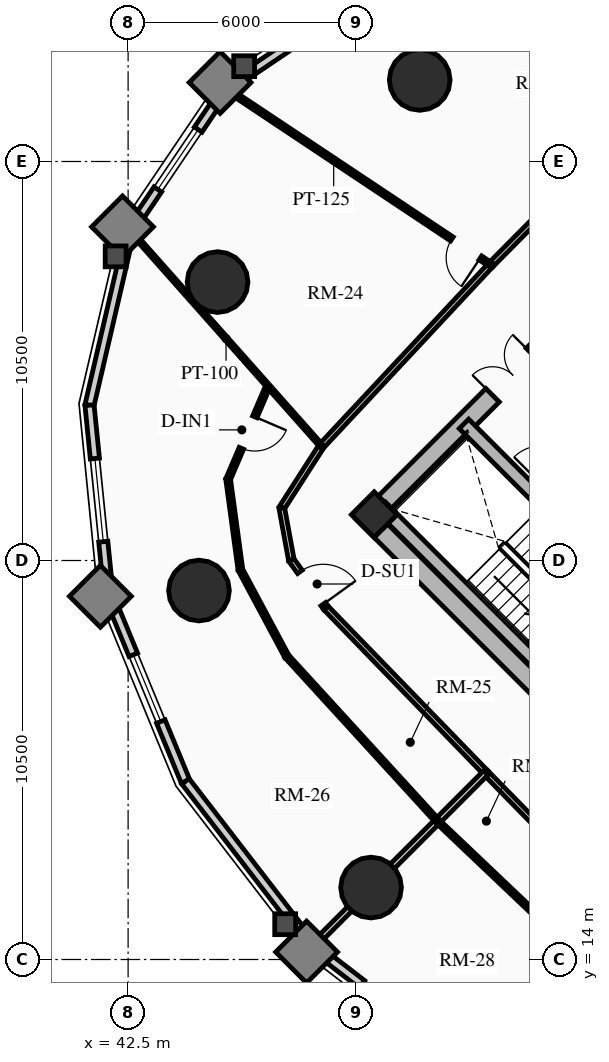
"""IFC4 building model, lengths in metres.
Left out: names, types, materials, properties, quantities, classifications, styles, units other than length and angle.
Written with IfcOpenShell. Run it as: python <this file> out.ifc"""

import sys

from ifc_helpers import new_model, si_unit, direction, frame, frame_2d, origin, origin_2d, place, context, subcontext, project, spatial, rectangle, circle, extrude, source, transform, mapped, element, fill, save


model = new_model("IFC4")
c1 = context("Model", 3, precision=1e-05, world=origin(), true_north=direction((0.0, 1.0)))
c2 = subcontext(c1, "Body", "Model", "MODEL_VIEW")
j1 = project(units=[si_unit("LENGTHUNIT", "METRE"), si_unit("PLANEANGLEUNIT", "RADIAN")], contexts=[c1])
p1 = place(None, origin())
s1 = spatial("IfcSite", under=j1, at=p1, CompositionType="ELEMENT")
p2 = place(p1, origin())
s2 = spatial("IfcBuilding", under=s1, at=p2, CompositionType="ELEMENT")
p3 = place(p2, frame((0.0, 0.0, 22.0)))
s3 = spatial("IfcBuildingStorey", under=s2, at=p3, CompositionType="ELEMENT", Elevation=22.0)
p4 = place(p3, frame((58.773, 15.661, 0.0), z_axis=(0.0, 0.0, 1.0), x_axis=(-0.707106781187, 0.707106781187, 0.0)))
e1 = element("IfcWall", 1, at=p4, inside=s3, PredefinedType="SHEAR", context=c2, shape_type="SweptSolid", body=[
    extrude(rectangle(XDim=14.3, YDim=0.5, at=frame_2d((7.15, 0.0))), origin(), (0.0, 0.0, 1.0), 2.91),
])
p5 = place(p3, frame((48.838, 25.596, 0.0), z_axis=(0.0, 0.0, 1.0), x_axis=(0.707106781187, 0.707106781187, 0.0)))
e2 = element("IfcWall", 2, at=p5, inside=s3, PredefinedType="SHEAR", context=c2, shape_type="SweptSolid", body=[
    extrude(rectangle(XDim=10.7, YDim=0.5, at=frame_2d((5.35, 0.0))), origin(), (0.0, 0.0, 1.0), 2.91),
])
m1 = source(origin(), c2, "Body", "SweptSolid", [
    extrude(rectangle(XDim=1.5, YDim=2.02, at=frame_2d((0.75, 1.01))), frame((0.0, 0.26, 0.0), z_axis=(0.0, -1.0, 0.0), x_axis=(1.0, 0.0, 0.0)), (0.0, 0.0, 1.0), 0.52),
])
p6 = place(p5, frame((4.6, 0.0, 0.0)))
e3 = element("IfcOpeningElement", 3, at=p6, cuts=e2, PredefinedType="OPENING", context=c2, shape_type="MappedRepresentation", body=[
    mapped(m1, transform((0.0, 0.0, 0.0), x_axis=(1.0, 0.0, 0.0), y_axis=(0.0, 1.0, 0.0), z_axis=(0.0, 0.0, 1.0), scale=1.0)),
])
p7 = place(p3, frame((61.096, 18.338, 0.0), z_axis=(0.0, 0.0, 1.0), x_axis=(-0.707106781187, 0.707106781187, 0.0)))
e4 = element("IfcWall", 4, at=p7, inside=s3, PredefinedType="SHEAR", context=c2, shape_type="SweptSolid", body=[
    extrude(rectangle(XDim=13.8, YDim=0.35, at=frame_2d((6.9, 0.0))), origin(), (0.0, 0.0, 1.0), 2.91),
])
m2 = source(origin(), c2, "Body", "SweptSolid", [
    extrude(rectangle(XDim=1.1, YDim=2.015, at=frame_2d((0.55, 1.007))), frame((0.0, 0.185, 0.0), z_axis=(0.0, -1.0, 0.0), x_axis=(1.0, 0.0, 0.0)), (0.0, 0.0, 1.0), 0.37),
])
p8 = place(p7, frame((4.9, 0.0, 0.0)))
e5 = element("IfcOpeningElement", 5, at=p8, cuts=e4, PredefinedType="OPENING", context=c2, shape_type="MappedRepresentation", body=[
    mapped(m2, transform((0.0, 0.0, 0.0), x_axis=(1.0, 0.0, 0.0), y_axis=(0.0, 1.0, 0.0), z_axis=(0.0, 0.0, 1.0), scale=1.0)),
])
m3 = source(origin(), c2, "Body", "SweptSolid", [
    extrude(rectangle(XDim=1.15, YDim=2.02, at=frame_2d((0.575, 1.01))), frame((0.0, 0.185, 0.0), z_axis=(0.0, -1.0, 0.0), x_axis=(1.0, 0.0, 0.0)), (0.0, 0.0, 1.0), 0.37),
])
p9 = place(p7, frame((7.32, 0.0, 0.0)))
e6 = element("IfcOpeningElement", 6, at=p9, cuts=e4, PredefinedType="OPENING", context=c2, shape_type="MappedRepresentation", body=[
    mapped(m3, transform((0.0, 0.0, 0.0), x_axis=(1.0, 0.0, 0.0), y_axis=(0.0, 1.0, 0.0), z_axis=(0.0, 0.0, 1.0), scale=1.0)),
])
p10 = place(p3, frame((53.922, 21.141, 0.0), z_axis=(0.0, 0.0, 1.0), x_axis=(-0.707106781187, 0.707106781187, 0.0)))
e7 = element("IfcWall", 7, at=p10, inside=s3, PredefinedType="SHEAR", context=c2, shape_type="SweptSolid", body=[
    extrude(rectangle(XDim=6.745, YDim=0.35, at=frame_2d((3.373, 0.0))), origin(), (0.0, 0.0, 1.0), 2.91),
])
p11 = place(p3, frame((48.976, 25.706, 0.0), z_axis=(0.0, 0.0, 1.0), x_axis=(0.707106781187, 0.707106781187, 0.0)))
e8 = element("IfcColumn", 8, at=p11, inside=s3, PredefinedType="COLUMN", context=c2, shape_type="SweptSolid", body=[
    extrude(rectangle(XDim=0.85, YDim=0.85, at=origin_2d()), origin(), (0.0, 0.0, 1.0), 2.91),
])
for number, where, z_axis, x_axis in (
    (9, (50.173, 37.146, 0.0), (0.0, 0.0, 1.0), (1.0, 0.0, 0.0)),
    (10, (44.854, 31.827, 0.0), (0.0, 0.0, 1.0), (1.0, 0.0, 0.0)),
    (11, (44.365, 23.709, 0.0), (0.0, 0.0, 1.0), (1.0, 0.0, 0.0)),
    (12, (48.893, 15.893, 0.0), (0.0, 0.0, 1.0), (1.0, 0.0, 0.0)),
):
    element("IfcColumn", number, at=place(p3, frame(where, z_axis=z_axis, x_axis=x_axis)), inside=s3, PredefinedType="USERDEFINED", context=c2, shape_type="SweptSolid", body=[
        extrude(circle(Radius=0.8, at=origin_2d()), origin(), (0.0, 0.0, 1.0), 2.91),
    ])
p12 = place(p3, frame((45.076, 36.924, 0.0), z_axis=(0.0, 0.0, 1.0), x_axis=(0.828776615238, 0.559579594012, 0.0)))
e13 = element("IfcWall", 13, at=p12, inside=s3, PredefinedType="SOLIDWALL", context=c2, shape_type="SweptSolid", body=[
    extrude(rectangle(XDim=4.517, YDim=0.24, at=frame_2d((2.259, 0.0))), origin(), (0.0, 0.0, 1.0), 2.073),
])
p13 = place(p3, frame((42.548, 33.18, 0.0), z_axis=(0.0, 0.0, 1.0), x_axis=(0.559579594012, 0.828776615238, 0.0)))
e14 = element("IfcWall", 14, at=p13, inside=s3, PredefinedType="SOLIDWALL", context=c2, shape_type="SweptSolid", body=[
    extrude(rectangle(XDim=4.517, YDim=0.24, at=frame_2d((2.259, 0.0))), origin(), (0.0, 0.0, 1.0), 2.073),
])
m4 = source(origin(), c2, "Body", "SweptSolid", [
    extrude(rectangle(XDim=1.9, YDim=1.35, at=frame_2d((0.95, 0.675))), frame((0.0, 0.13, 0.0), z_axis=(0.0, -1.0, 0.0), x_axis=(1.0, 0.0, 0.0)), (0.0, 0.0, 1.0), 0.26),
])
p14 = place(p13, frame((1.309, 0.0, 0.65)))
e15 = element("IfcOpeningElement", 15, at=p14, cuts=e14, PredefinedType="OPENING", context=c2, shape_type="MappedRepresentation", body=[
    mapped(m4, transform((0.0, 0.0, 0.0), x_axis=(1.0, 0.0, 0.0), y_axis=(0.0, 1.0, 0.0), z_axis=(0.0, 0.0, 1.0), scale=1.0)),
])
p15 = place(p3, frame((41.484, 28.586, 0.0), z_axis=(0.0, 0.0, 1.0), x_axis=(0.225698919833, 0.974197104074, 0.0)))
e16 = element("IfcWall", 16, at=p15, inside=s3, PredefinedType="SOLIDWALL", context=c2, shape_type="SweptSolid", body=[
    extrude(rectangle(XDim=4.715, YDim=0.24, at=frame_2d((2.357, 0.0))), origin(), (0.0, 0.0, 1.0), 2.073),
])
p16 = place(p3, frame((41.988, 23.593, 0.0), z_axis=(0.0, 0.0, 1.0), x_axis=(-0.100356187272, 0.994951574538, 0.0)))
e17 = element("IfcWall", 17, at=p16, inside=s3, PredefinedType="SOLIDWALL", context=c2, shape_type="SweptSolid", body=[
    extrude(rectangle(XDim=5.019, YDim=0.24, at=frame_2d((2.509, 0.0))), origin(), (0.0, 0.0, 1.0), 2.073),
])
m5 = source(origin(), c2, "Body", "SweptSolid", [
    extrude(rectangle(XDim=2.2, YDim=1.35, at=frame_2d((1.1, 0.675))), frame((0.0, 0.13, 0.0), z_axis=(0.0, -1.0, 0.0), x_axis=(1.0, 0.0, 0.0)), (0.0, 0.0, 1.0), 0.26),
])
p17 = place(p16, frame((1.409, 0.0, 0.65)))
e18 = element("IfcOpeningElement", 18, at=p17, cuts=e17, PredefinedType="OPENING", context=c2, shape_type="MappedRepresentation", body=[
    mapped(m5, transform((0.0, 0.0, 0.0), x_axis=(1.0, 0.0, 0.0), y_axis=(0.0, 1.0, 0.0), z_axis=(0.0, 0.0, 1.0), scale=1.0)),
])
p18 = place(p3, frame((44.01, 18.688, 0.0), z_axis=(0.0, 0.0, 1.0), x_axis=(-0.381113147118, 0.924528403616, 0.0)))
e19 = element("IfcWall", 19, at=p18, inside=s3, PredefinedType="SOLIDWALL", context=c2, shape_type="SweptSolid", body=[
    extrude(rectangle(XDim=5.305, YDim=0.24, at=frame_2d((2.653, 0.0))), origin(), (0.0, 0.0, 1.0), 2.073),
])
p19 = place(p18, frame((1.703, 0.0, 0.65)))
e20 = element("IfcOpeningElement", 20, at=p19, cuts=e19, PredefinedType="OPENING", context=c2, shape_type="MappedRepresentation", body=[
    mapped(m4, transform((0.0, 0.0, 0.0), x_axis=(1.0, 0.0, 0.0), y_axis=(0.0, 1.0, 0.0), z_axis=(0.0, 0.0, 1.0), scale=1.0)),
])
p20 = place(p3, frame((47.352, 14.352, 0.0), z_axis=(0.0, 0.0, 1.0), x_axis=(-0.610557396243, 0.791972010801, 0.0)))
e21 = element("IfcWall", 21, at=p20, inside=s3, PredefinedType="SOLIDWALL", context=c2, shape_type="SweptSolid", body=[
    extrude(rectangle(XDim=5.475, YDim=0.24, at=frame_2d((2.737, 0.0))), origin(), (0.0, 0.0, 1.0), 2.073),
])
p21 = place(p3, frame((51.688, 11.01, 0.0), z_axis=(0.0, 0.0, 1.0), x_axis=(-0.791972010801, 0.610557396243, 0.0)))
e22 = element("IfcWall", 22, at=p21, inside=s3, PredefinedType="SOLIDWALL", context=c2, shape_type="SweptSolid", body=[
    extrude(rectangle(XDim=5.475, YDim=0.24, at=frame_2d((2.737, 0.0))), origin(), (0.0, 0.0, 1.0), 2.073),
])
p22 = place(p21, frame((1.637, 0.0, 0.65)))
e23 = element("IfcOpeningElement", 23, at=p22, cuts=e22, PredefinedType="OPENING", context=c2, shape_type="MappedRepresentation", body=[
    mapped(m5, transform((0.0, 0.0, 0.0), x_axis=(1.0, 0.0, 0.0), y_axis=(0.0, 1.0, 0.0), z_axis=(0.0, 0.0, 1.0), scale=1.0)),
])
p23 = place(p3, frame((54.427, 34.683, 0.0), z_axis=(0.0, 0.0, 1.0), x_axis=(-0.704178989986, -0.710022499687, 0.0)))
e24 = element("IfcWall", 24, at=p23, inside=s3, PredefinedType="PARTITIONING", context=c2, shape_type="SweptSolid", body=[
    extrude(rectangle(XDim=3.384, YDim=0.15, at=frame_2d((1.692, 0.0))), origin(), (0.0, 0.0, 1.0), 2.159),
])
p24 = place(p3, frame((52.043, 32.28, 0.0), z_axis=(0.0, 0.0, 1.0), x_axis=(-0.682606081633, -0.730786519661, 0.0)))
e25 = element("IfcWall", 25, at=p24, inside=s3, PredefinedType="PARTITIONING", context=c2, shape_type="SweptSolid", body=[
    extrude(rectangle(XDim=6.527, YDim=0.15, at=frame_2d((3.263, 0.0))), origin(), (0.0, 0.0, 1.0), 2.159),
])
p25 = place(p3, frame((47.588, 27.51, 0.0), z_axis=(0.0, 0.0, 1.0), x_axis=(-0.540202619347, -0.841534984449, 0.0)))
e26 = element("IfcWall", 26, at=p25, inside=s3, PredefinedType="PARTITIONING", context=c2, shape_type="SweptSolid", body=[
    extrude(rectangle(XDim=1.935, YDim=0.15, at=frame_2d((0.967, 0.0))), origin(), (0.0, 0.0, 1.0), 2.159),
])
p26 = place(p3, frame((46.543, 25.882, 0.0), z_axis=(0.0, 0.0, 1.0), x_axis=(0.181153502579, -0.983454832976, 0.0)))
e27 = element("IfcWall", 27, at=p26, inside=s3, PredefinedType="PARTITIONING", context=c2, shape_type="SweptSolid", body=[
    extrude(rectangle(XDim=1.392, YDim=0.15, at=frame_2d((0.696, 0.0))), origin(), (0.0, 0.0, 1.0), 2.159),
])
p27 = place(p3, frame((46.795, 24.513, 0.0), z_axis=(0.0, 0.0, 1.0), x_axis=(0.585628197524, -0.810579801294, 0.0)))
e28 = element("IfcWall", 28, at=p27, inside=s3, PredefinedType="PARTITIONING", context=c2, shape_type="SweptSolid", body=[
    extrude(rectangle(XDim=1.554, YDim=0.15, at=frame_2d((0.777, 0.0))), origin(), (0.0, 0.0, 1.0), 2.205),
])
m6 = source(origin(), c2, "Body", "SweptSolid", [
    extrude(rectangle(XDim=1.05, YDim=2.015, at=frame_2d((0.525, 1.007))), frame((0.0, 0.085, 0.0), z_axis=(0.0, -1.0, 0.0), x_axis=(1.0, 0.0, 0.0)), (0.0, 0.0, 1.0), 0.17),
])
p28 = place(p27, frame((0.384, 0.0, 0.0)))
e29 = element("IfcOpeningElement", 29, at=p28, cuts=e28, PredefinedType="OPENING", context=c2, shape_type="MappedRepresentation", body=[
    mapped(m6, transform((0.0, 0.0, 0.0), x_axis=(1.0, 0.0, 0.0), y_axis=(0.0, 1.0, 0.0), z_axis=(0.0, 0.0, 1.0), scale=1.0)),
])
p29 = place(p3, frame((47.706, 23.253, 0.0), z_axis=(0.0, 0.0, 1.0), x_axis=(0.696179266346, -0.717867974707, 0.0)))
e30 = element("IfcWall", 30, at=p29, inside=s3, PredefinedType="PARTITIONING", context=c2, shape_type="SweptSolid", body=[
    extrude(rectangle(XDim=6.045, YDim=0.15, at=frame_2d((3.022, 0.0))), origin(), (0.0, 0.0, 1.0), 2.635),
])
p30 = place(p3, frame((51.914, 18.914, 0.0), z_axis=(0.0, 0.0, 1.0), x_axis=(0.699999313799, -0.714143515465, 0.0)))
e31 = element("IfcWall", 31, at=p30, inside=s3, PredefinedType="PARTITIONING", context=c2, shape_type="SweptSolid", body=[
    extrude(rectangle(XDim=6.162, YDim=0.15, at=frame_2d((3.081, 0.0))), origin(), (0.0, 0.0, 1.0), 2.159),
])
p31 = place(p3, frame((47.588, 27.51, 0.0), z_axis=(0.0, 0.0, 1.0), x_axis=(-0.663646630644, 0.74804622159, 0.0)))
e32 = element("IfcWall", 32, at=p31, inside=s3, PredefinedType="MOVABLE", context=c2, shape_type="SweptSolid", body=[
    extrude(rectangle(XDim=7.567, YDim=0.1, at=frame_2d((3.784, 0.0))), origin(), (0.0, 0.0, 1.0), 2.073),
])
p32 = place(p3, frame((51.914, 18.914, 0.0), z_axis=(0.0, 0.0, 1.0), x_axis=(-0.707106781187, -0.707106781187, 0.0)))
e33 = element("IfcWall", 33, at=p32, inside=s3, PredefinedType="PARTITIONING", context=c2, shape_type="SweptSolid", body=[
    extrude(rectangle(XDim=6.431, YDim=0.16, at=frame_2d((3.215, 0.0))), origin(), (0.0, 0.0, 1.0), 2.073),
])
p33 = place(p3, frame((52.043, 32.28, 0.0), z_axis=(0.0, 0.0, 1.0), x_axis=(-0.832355916658, 0.554241488887, 0.0)))
e34 = element("IfcWall", 34, at=p33, inside=s3, PredefinedType="PARTITIONING", context=c2, shape_type="SweptSolid", body=[
    extrude(rectangle(XDim=8.354, YDim=0.125, at=frame_2d((4.177, 0.0))), origin(), (0.0, 0.0, 1.0), 2.073),
])
m7 = source(origin(), c2, "Body", "SweptSolid", [
    extrude(rectangle(XDim=0.9, YDim=2.005, at=frame_2d((0.45, 1.002))), frame((0.0, 0.073, 0.0), z_axis=(0.0, -1.0, 0.0), x_axis=(1.0, 0.0, 0.0)), (0.0, 0.0, 1.0), 0.145),
])
p34 = place(p33, frame((0.33, 0.0, 0.0)))
e35 = element("IfcOpeningElement", 35, at=p34, cuts=e34, PredefinedType="OPENING", context=c2, shape_type="MappedRepresentation", body=[
    mapped(m7, transform((0.0, 0.0, 0.0), x_axis=(1.0, 0.0, 0.0), y_axis=(0.0, 1.0, 0.0), z_axis=(0.0, 0.0, 1.0), scale=1.0)),
])
p35 = place(p3, frame((46.182, 29.095, 0.0), z_axis=(0.0, 0.0, 1.0), x_axis=(-0.39298176502, -0.919546264394, 0.0)))
e36 = element("IfcWall", 36, at=p35, inside=s3, PredefinedType="PARTITIONING", context=c2, shape_type="SweptSolid", body=[
    extrude(rectangle(XDim=2.672, YDim=0.125, at=frame_2d((1.336, 0.0))), origin(), (0.0, 0.0, 1.0), 2.205),
])
p36 = place(p35, frame((0.886, 0.0, 0.0)))
e37 = element("IfcOpeningElement", 37, at=p36, cuts=e36, PredefinedType="OPENING", context=c2, shape_type="MappedRepresentation", body=[
    mapped(m7, transform((0.0, 0.0, 0.0), x_axis=(1.0, 0.0, 0.0), y_axis=(0.0, 1.0, 0.0), z_axis=(0.0, 0.0, 1.0), scale=1.0)),
])
p37 = place(p3, frame((45.132, 26.638, 0.0), z_axis=(0.0, 0.0, 1.0), x_axis=(0.134279147929, -0.990943545532, 0.0)))
e38 = element("IfcWall", 38, at=p37, inside=s3, PredefinedType="PARTITIONING", context=c2, shape_type="SweptSolid", body=[
    extrude(rectangle(XDim=2.404, YDim=0.125, at=frame_2d((1.202, 0.0))), origin(), (0.0, 0.0, 1.0), 2.159),
])
p38 = place(p3, frame((45.455, 24.256, 0.0), z_axis=(0.0, 0.0, 1.0), x_axis=(0.472268582458, -0.881454698792, 0.0)))
e39 = element("IfcWall", 39, at=p38, inside=s3, PredefinedType="PARTITIONING", context=c2, shape_type="SweptSolid", body=[
    extrude(rectangle(XDim=2.585, YDim=0.125, at=frame_2d((1.292, 0.0))), origin(), (0.0, 0.0, 1.0), 2.159),
])
p39 = place(p3, frame((46.676, 21.978, 0.0), z_axis=(0.0, 0.0, 1.0), x_axis=(0.67473816271, -0.738057187339, 0.0)))
e40 = element("IfcWall", 40, at=p39, inside=s3, PredefinedType="PARTITIONING", context=c2, shape_type="SweptSolid", body=[
    extrude(rectangle(XDim=5.876, YDim=0.125, at=frame_2d((2.938, 0.0))), origin(), (0.0, 0.0, 1.0), 2.635),
])
p40 = place(p3, frame((50.641, 17.641, 0.0), z_axis=(0.0, 0.0, 1.0), x_axis=(0.724909383019, -0.688844239586, 0.0)))
e41 = element("IfcWall", 41, at=p40, inside=s3, PredefinedType="PARTITIONING", context=c2, shape_type="SweptSolid", body=[
    extrude(rectangle(XDim=5.957, YDim=0.125, at=frame_2d((2.979, 0.0))), origin(), (0.0, 0.0, 1.0), 2.159),
])
m8 = source(origin(), c2, "Body", "SweptSolid", [
    extrude(rectangle(XDim=1.9, YDim=1.35, at=frame_2d((0.95, 0.675))), frame((0.0, 0.03, 0.0), z_axis=(0.0, -1.0, 0.0), x_axis=(1.0, 0.0, 0.0)), (0.0, 0.0, 1.0), 0.06),
])
p41 = place(p14, origin())
e42 = element("IfcWindow", 42, at=p41, inside=s3, PartitioningType="DOUBLE_PANEL_VERTICAL", PredefinedType="WINDOW", context=c2, shape_type="MappedRepresentation", body=[
    mapped(m8, transform((0.0, 0.0, 0.0), x_axis=(1.0, 0.0, 0.0), y_axis=(0.0, 1.0, 0.0), z_axis=(0.0, 0.0, 1.0), scale=1.0)),
])
fill(e15, e42)
m9 = source(origin(), c2, "Body", "SweptSolid", [
    extrude(rectangle(XDim=2.2, YDim=1.35, at=frame_2d((1.1, 0.675))), frame((0.0, 0.03, 0.0), z_axis=(0.0, -1.0, 0.0), x_axis=(1.0, 0.0, 0.0)), (0.0, 0.0, 1.0), 0.06),
])
p42 = place(p17, origin())
e43 = element("IfcWindow", 43, at=p42, inside=s3, PartitioningType="DOUBLE_PANEL_VERTICAL", PredefinedType="WINDOW", context=c2, shape_type="MappedRepresentation", body=[
    mapped(m9, transform((0.0, 0.0, 0.0), x_axis=(1.0, 0.0, 0.0), y_axis=(0.0, 1.0, 0.0), z_axis=(0.0, 0.0, 1.0), scale=1.0)),
])
fill(e18, e43)
p43 = place(p19, origin())
e44 = element("IfcWindow", 44, at=p43, inside=s3, PartitioningType="DOUBLE_PANEL_VERTICAL", PredefinedType="WINDOW", context=c2, shape_type="MappedRepresentation", body=[
    mapped(m8, transform((0.0, 0.0, 0.0), x_axis=(1.0, 0.0, 0.0), y_axis=(0.0, 1.0, 0.0), z_axis=(0.0, 0.0, 1.0), scale=1.0)),
])
fill(e20, e44)
m10 = source(origin(), c2, "Body", "SweptSolid", [
    extrude(rectangle(XDim=1.5, YDim=2.02, at=frame_2d((0.75, 1.01))), frame((0.0, 0.025, 0.0), z_axis=(0.0, -1.0, 0.0), x_axis=(1.0, 0.0, 0.0)), (0.0, 0.0, 1.0), 0.05),
])
p44 = place(p6, origin())
e45 = element("IfcDoor", 45, at=p44, inside=s3, OperationType="DOUBLE_DOOR_SINGLE_SWING", PredefinedType="DOOR", context=c2, shape_type="MappedRepresentation", body=[
    mapped(m10, transform((0.0, 0.0, 0.0), x_axis=(1.0, 0.0, 0.0), y_axis=(0.0, 1.0, 0.0), z_axis=(0.0, 0.0, 1.0), scale=1.0)),
])
fill(e3, e45)
m11 = source(origin(), c2, "Body", "SweptSolid", [
    extrude(rectangle(XDim=0.9, YDim=2.005, at=frame_2d((0.45, 1.002))), frame((0.0, 0.025, 0.0), z_axis=(0.0, -1.0, 0.0), x_axis=(1.0, 0.0, 0.0)), (0.0, 0.0, 1.0), 0.05),
])
p45 = place(p34, origin())
e46 = element("IfcDoor", 46, at=p45, inside=s3, OperationType="SINGLE_SWING_LEFT", PredefinedType="DOOR", context=c2, shape_type="MappedRepresentation", body=[
    mapped(m11, transform((0.0, 0.0, 0.0), x_axis=(1.0, 0.0, 0.0), y_axis=(0.0, 1.0, 0.0), z_axis=(0.0, 0.0, 1.0), scale=1.0)),
])
fill(e35, e46)
m12 = source(origin(), c2, "Body", "SweptSolid", [
    extrude(rectangle(XDim=1.05, YDim=2.015, at=frame_2d((0.525, 1.007))), frame((0.0, 0.025, 0.0), z_axis=(0.0, -1.0, 0.0), x_axis=(1.0, 0.0, 0.0)), (0.0, 0.0, 1.0), 0.05),
])
p46 = place(p28, origin())
e47 = element("IfcDoor", 47, at=p46, inside=s3, OperationType="SINGLE_SWING_RIGHT", PredefinedType="DOOR", context=c2, shape_type="MappedRepresentation", body=[
    mapped(m12, transform((0.0, 0.0, 0.0), x_axis=(1.0, 0.0, 0.0), y_axis=(0.0, 1.0, 0.0), z_axis=(0.0, 0.0, 1.0), scale=1.0)),
])
fill(e29, e47)
p47 = place(p36, origin())
e48 = element("IfcDoor", 48, at=p47, inside=s3, OperationType="SINGLE_SWING_LEFT", PredefinedType="DOOR", context=c2, shape_type="MappedRepresentation", body=[
    mapped(m11, transform((0.0, 0.0, 0.0), x_axis=(1.0, 0.0, 0.0), y_axis=(0.0, 1.0, 0.0), z_axis=(0.0, 0.0, 1.0), scale=1.0)),
])
fill(e37, e48)
save(model, sys.argv[1])
